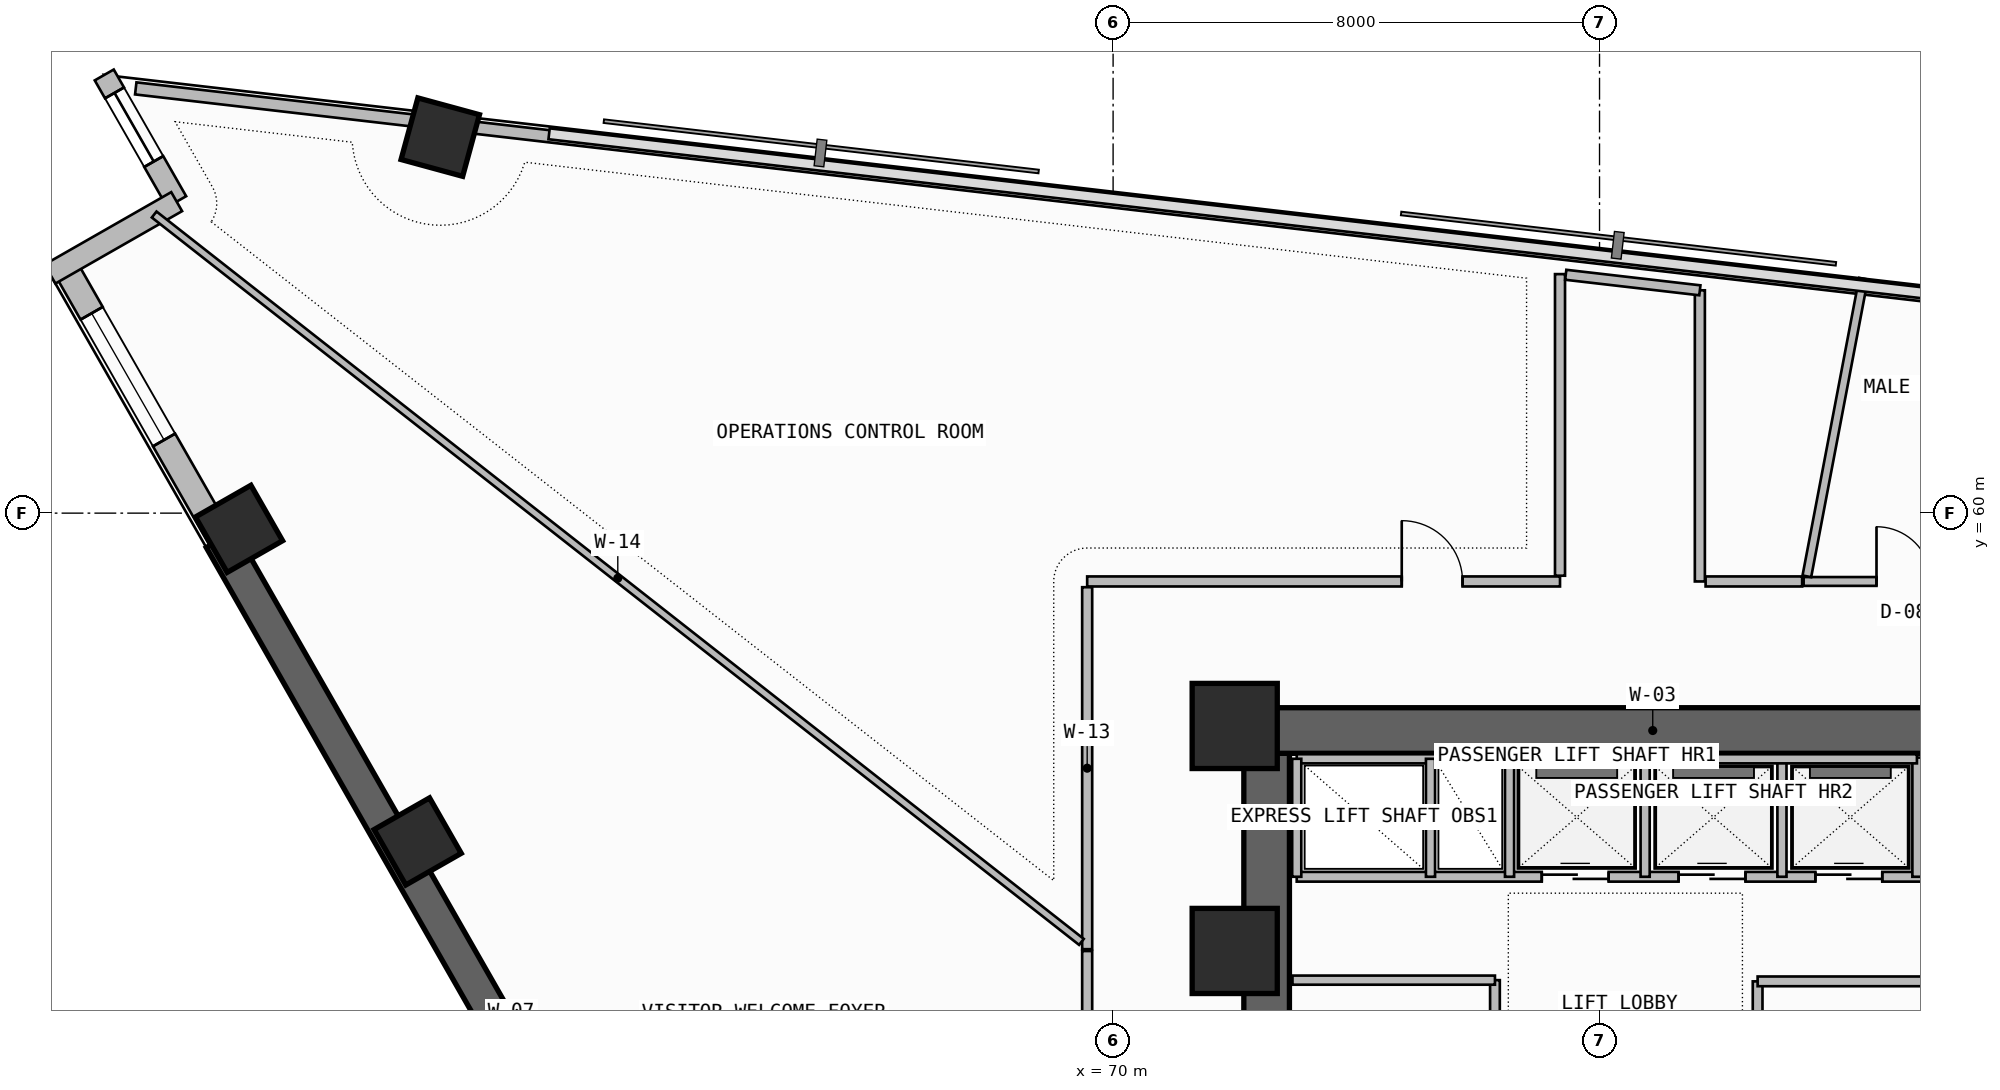
"""IFC4 building model, lengths in metres.
Left out: names, types, materials, properties, quantities, classifications, styles, units other than length and angle.
Written with IfcOpenShell. Run it as: python <this file> out.ifc"""

import sys

from ifc_helpers import new_model, si_unit, direction, frame, frame_2d, origin, origin_2d, place, context, subcontext, project, spatial, rectangle, extrude, element, fill, save


model = new_model("IFC4")
c1 = context("Model", 3, precision=1e-05, world=origin(), true_north=direction((0.0, 1.0)))
c2 = subcontext(c1, "Body", "Model", "MODEL_VIEW")
j1 = project(units=[si_unit("LENGTHUNIT", "METRE"), si_unit("PLANEANGLEUNIT", "RADIAN")], contexts=[c1])
p1 = place(None, origin())
s1 = spatial("IfcSite", under=j1, at=p1, CompositionType="ELEMENT")
p2 = place(p1, origin())
s2 = spatial("IfcBuilding", under=s1, at=p2, CompositionType="ELEMENT")
p3 = place(p2, frame((0.0, 0.0, 229.06)))
s3 = spatial("IfcBuildingStorey", under=s2, at=p3, CompositionType="ELEMENT", Elevation=229.06)
p4 = place(p3, frame((72.525, 43.35, -0.26), z_axis=(0.0, 0.0, 1.0), x_axis=(0.0, 1.0, 0.0)))
e1 = element("IfcWall", 1, at=p4, inside=s3, PredefinedType="SHEAR", context=c2, shape_type="SweptSolid", body=[
    extrude(rectangle(XDim=12.7, YDim=0.75, at=frame_2d((6.35, 0.0))), origin(), (0.0, 0.0, 1.0), 3.52),
])
p5 = place(p4, frame((1.35, 0.0, 0.26)))
e2 = element("IfcOpeningElement", 2, at=p5, cuts=e1, PredefinedType="OPENING", context=c2, shape_type="SweptSolid", body=[
    extrude(rectangle(XDim=1.2, YDim=2.2, at=frame_2d((0.6, 1.1))), frame((0.0, 0.385, 0.0), z_axis=(0.0, -1.0, 0.0), x_axis=(1.0, 0.0, 0.0)), (0.0, 0.0, 1.0), 0.77),
])
p6 = place(p3, frame((72.0, 56.425, -0.26), z_axis=(0.0, 0.0, 1.0), x_axis=(1.0, 0.0, 0.0)))
e3 = element("IfcWall", 3, at=p6, inside=s3, PredefinedType="SHEAR", context=c2, shape_type="SweptSolid", body=[
    extrude(rectangle(XDim=13.75, YDim=0.75, at=frame_2d((6.875, 0.0))), origin(), (0.0, 0.0, 1.0), 3.52),
])
for number, where, z_axis, x_axis in (
    (4, (72.0, 52.8, 0.0), (0.0, 0.0, 1.0), (1.0, 0.0, 0.0)),
    (5, (72.0, 56.5, 0.0), (0.0, 0.0, 1.0), (1.0, 0.0, 0.0)),
):
    element("IfcColumn", number, at=place(p3, frame(where, z_axis=z_axis, x_axis=x_axis)), inside=s3, PredefinedType="COLUMN", context=c2, shape_type="SweptSolid", body=[
        extrude(rectangle(XDim=1.4, YDim=1.4, at=origin_2d()), origin(), (0.0, 0.0, 1.0), 3.52),
    ])
for number, where, z_axis, x_axis in (
    (6, (58.934, 66.184, 0.0), (0.0, 0.0, 1.0), (0.263, 0.965, 0.0)),
    (7, (55.625, 59.742, 0.0), (0.0, 0.0, 1.0), (-0.496, 0.868, 0.0)),
    (8, (58.563, 54.601, 0.0), (0.0, 0.0, 1.0), (-0.496, 0.868, 0.0)),
):
    element("IfcColumn", number, at=place(p3, frame(where, z_axis=z_axis, x_axis=x_axis)), inside=s3, PredefinedType="COLUMN", context=c2, shape_type="SweptSolid", body=[
        extrude(rectangle(XDim=1.05, YDim=1.05, at=origin_2d()), origin(), (0.0, 0.0, 1.0), 3.52),
    ])
p7 = place(p3, frame((52.754, 64.068, 0.0), z_axis=(0.0, 0.0, 1.0), x_axis=(0.496209984367, -0.868202540548, 0.0)))
e9 = element("IfcWall", 9, at=p7, inside=s3, PredefinedType="SOLIDWALL", context=c2, shape_type="SweptSolid", body=[
    extrude(rectangle(XDim=5.181, YDim=0.42, at=frame_2d((2.59, 0.0))), origin(), (0.0, 0.0, 1.0), 2.237),
])
p8 = place(p7, frame((0.9, 0.0, 0.957)))
e10 = element("IfcOpeningElement", 10, at=p8, cuts=e9, PredefinedType="OPENING", context=c2, shape_type="SweptSolid", body=[
    extrude(rectangle(XDim=2.4, YDim=1.2, at=frame_2d((1.2, 0.6))), frame((0.0, 0.22, 0.0), z_axis=(0.0, -1.0, 0.0), x_axis=(1.0, 0.0, 0.0)), (0.0, 0.0, 1.0), 0.44),
])
p9 = place(p3, frame((55.325, 59.57, -0.26), z_axis=(0.0, 0.0, 1.0), x_axis=(0.496211351597, -0.868201759124, 0.0)))
e11 = element("IfcWall", 11, at=p9, inside=s3, PredefinedType="SHEAR", context=c2, shape_type="SweptSolid", body=[
    extrude(rectangle(XDim=19.243, YDim=0.55, at=frame_2d((9.622, 0.0))), origin(), (0.0, 0.0, 1.0), 3.52),
])
p10 = place(p3, frame((53.408, 67.206, 0.0), z_axis=(0.0, 0.0, 1.0), x_axis=(0.496292324652, -0.868155474838, 0.0)))
e12 = element("IfcWall", 12, at=p10, inside=s3, PredefinedType="SOLIDWALL", context=c2, shape_type="SweptSolid", body=[
    extrude(rectangle(XDim=2.4, YDim=0.36, at=frame_2d((1.2, 0.0))), origin(), (0.0, 0.0, 1.0), 3.26),
])
p11 = place(p10, frame((0.34, 0.0, 0.45)))
e13 = element("IfcOpeningElement", 13, at=p11, cuts=e12, PredefinedType="OPENING", context=c2, shape_type="SweptSolid", body=[
    extrude(rectangle(XDim=1.3, YDim=2.4, at=frame_2d((0.65, 1.2))), frame((0.0, 0.19, 0.0), z_axis=(0.0, -1.0, 0.0), x_axis=(1.0, 0.0, 0.0)), (0.0, 0.0, 1.0), 0.38),
])
p12 = place(p3, frame((54.599, 65.123, 0.0), z_axis=(0.0, 0.0, 1.0), x_axis=(-0.86818053093, -0.4962484919, 0.0)))
e14 = element("IfcWall", 14, at=p12, inside=s3, PredefinedType="SOLIDWALL", context=c2, shape_type="SweptSolid", body=[
    extrude(rectangle(XDim=2.4, YDim=0.36, at=frame_2d((1.2, 0.0))), origin(), (0.0, 0.0, 1.0), 3.26),
])
p13 = place(p3, frame((85.424, 63.338, 0.0), z_axis=(0.0, 0.0, 1.0), x_axis=(-0.993364714048, 0.115006716693, 0.0)))
e15 = element("IfcWall", 15, at=p13, inside=s3, PredefinedType="PARAPET", context=c2, shape_type="SweptSolid", body=[
    extrude(rectangle(XDim=26.302, YDim=0.2, at=frame_2d((13.151, 0.0))), origin(), (0.0, 0.0, 1.0), 1.15),
])
p14 = place(p3, frame((58.622, 66.441, 0.0), z_axis=(0.0, 0.0, 1.0), x_axis=(-0.993362937665, 0.115022059074, 0.0)))
e16 = element("IfcWall", 16, at=p14, inside=s3, PredefinedType="PARAPET", context=c2, shape_type="SweptSolid", body=[
    extrude(rectangle(XDim=4.727, YDim=0.2, at=frame_2d((2.364, 0.0))), origin(), (0.0, 0.0, 1.0), 1.15),
])
p15 = place(p3, frame((76.28, 47.18, 0.0), z_axis=(0.0, 0.0, 1.0), x_axis=(0.0, 1.0, 0.0)))
e17 = element("IfcWall", 17, at=p15, inside=s3, PredefinedType="SOLIDWALL", context=c2, shape_type="SweptSolid", body=[
    extrude(rectangle(XDim=5.14, YDim=0.16, at=frame_2d((2.57, 0.0))), origin(), (0.0, 0.0, 1.0), 3.26),
])
p16 = place(p15, frame((1.8, 0.0, 0.0)))
e18 = element("IfcOpeningElement", 18, at=p16, cuts=e17, PredefinedType="OPENING", context=c2, shape_type="SweptSolid", body=[
    extrude(rectangle(XDim=1.5, YDim=2.25, at=frame_2d((0.75, 1.125))), frame((0.0, 0.09, 0.0), z_axis=(0.0, -1.0, 0.0), x_axis=(1.0, 0.0, 0.0)), (0.0, 0.0, 1.0), 0.18),
])
p17 = place(p3, frame((72.95, 52.32, 0.0), z_axis=(0.0, 0.0, 1.0), x_axis=(1.0, 0.0, 0.0)))
e19 = element("IfcWall", 19, at=p17, inside=s3, PredefinedType="SOLIDWALL", context=c2, shape_type="SweptSolid", body=[
    extrude(rectangle(XDim=3.33, YDim=0.15, at=frame_2d((1.665, 0.0))), origin(), (0.0, 0.0, 1.0), 3.26),
])
p18 = place(p3, frame((80.6, 47.7, 0.0), z_axis=(0.0, 0.0, 1.0), x_axis=(0.0, 1.0, 0.0)))
e20 = element("IfcWall", 20, at=p18, inside=s3, PredefinedType="SOLIDWALL", context=c2, shape_type="SweptSolid", body=[
    extrude(rectangle(XDim=4.6, YDim=0.16, at=frame_2d((2.3, 0.0))), origin(), (0.0, 0.0, 1.0), 3.26),
])
p19 = place(p18, frame((1.8, 0.0, 0.0)))
e21 = element("IfcOpeningElement", 21, at=p19, cuts=e20, PredefinedType="OPENING", context=c2, shape_type="SweptSolid", body=[
    extrude(rectangle(XDim=1.0, YDim=2.2, at=frame_2d((0.5, 1.1))), frame((0.0, 0.09, 0.0), z_axis=(0.0, -1.0, 0.0), x_axis=(1.0, 0.0, 0.0)), (0.0, 0.0, 1.0), 0.18),
])
p20 = place(p3, frame((80.6, 52.3, 0.0), z_axis=(0.0, 0.0, 1.0), x_axis=(1.0, 0.0, 0.0)))
e22 = element("IfcWall", 22, at=p20, inside=s3, PredefinedType="SOLIDWALL", context=c2, shape_type="SweptSolid", body=[
    extrude(rectangle(XDim=4.22, YDim=0.16, at=frame_2d((2.11, 0.0))), origin(), (0.0, 0.0, 1.0), 3.26),
])
p21 = place(p3, frame((73.02, 54.02, 0.0), z_axis=(0.0, 0.0, 1.0), x_axis=(1.0, 0.0, 0.0)))
e23 = element("IfcWall", 23, at=p21, inside=s3, PredefinedType="SOLIDWALL", context=c2, shape_type="SweptSolid", body=[
    extrude(rectangle(XDim=12.08, YDim=0.16, at=frame_2d((6.04, 0.0))), origin(), (0.0, 0.0, 1.0), 3.26),
])
p22 = place(p21, frame((4.03, 0.0, 0.0)))
e24 = element("IfcOpeningElement", 24, at=p22, cuts=e23, PredefinedType="OPENING", context=c2, shape_type="SweptSolid", body=[
    extrude(rectangle(XDim=1.1, YDim=2.25, at=frame_2d((0.55, 1.125))), frame((0.0, 0.09, 0.0), z_axis=(0.0, -1.0, 0.0), x_axis=(1.0, 0.0, 0.0)), (0.0, 0.0, 1.0), 0.18),
])
p23 = place(p21, frame((6.28, 0.0, 0.0)))
e25 = element("IfcOpeningElement", 25, at=p23, cuts=e23, PredefinedType="OPENING", context=c2, shape_type="SweptSolid", body=[
    extrude(rectangle(XDim=1.1, YDim=2.25, at=frame_2d((0.55, 1.125))), frame((0.0, 0.09, 0.0), z_axis=(0.0, -1.0, 0.0), x_axis=(1.0, 0.0, 0.0)), (0.0, 0.0, 1.0), 0.18),
])
p24 = place(p21, frame((8.53, 0.0, 0.0)))
e26 = element("IfcOpeningElement", 26, at=p24, cuts=e23, PredefinedType="OPENING", context=c2, shape_type="SweptSolid", body=[
    extrude(rectangle(XDim=1.1, YDim=2.25, at=frame_2d((0.55, 1.125))), frame((0.0, 0.09, 0.0), z_axis=(0.0, -1.0, 0.0), x_axis=(1.0, 0.0, 0.0)), (0.0, 0.0, 1.0), 0.18),
])
p25 = place(p3, frame((73.02, 55.96, 0.0), z_axis=(0.0, 0.0, 1.0), x_axis=(1.0, 0.0, 0.0)))
e27 = element("IfcWall", 27, at=p25, inside=s3, PredefinedType="SOLIDWALL", context=c2, shape_type="SweptSolid", body=[
    extrude(rectangle(XDim=3.5, YDim=0.15, at=frame_2d((1.75, 0.0))), origin(), (0.0, 0.0, 1.0), 3.26),
])
p26 = place(p3, frame((73.02, 54.02, 0.0), z_axis=(0.0, 0.0, 1.0), x_axis=(0.0, 1.0, 0.0)))
e28 = element("IfcWall", 28, at=p26, inside=s3, PredefinedType="PLUMBINGWALL", context=c2, shape_type="SweptSolid", body=[
    extrude(rectangle(XDim=1.94, YDim=0.15, at=frame_2d((0.97, 0.0))), origin(), (0.0, 0.0, 1.0), 3.26),
])
p27 = place(p3, frame((76.52, 54.02, 0.0), z_axis=(0.0, 0.0, 1.0), x_axis=(0.0, 1.0, 0.0)))
e29 = element("IfcWall", 29, at=p27, inside=s3, PredefinedType="SOLIDWALL", context=c2, shape_type="SweptSolid", body=[
    extrude(rectangle(XDim=1.94, YDim=0.15, at=frame_2d((0.97, 0.0))), origin(), (0.0, 0.0, 1.0), 3.26),
])
p28 = place(p3, frame((75.22, 54.02, 0.0), z_axis=(0.0, 0.0, 1.0), x_axis=(0.0, 1.0, 0.0)))
e30 = element("IfcWall", 30, at=p28, inside=s3, PredefinedType="PLUMBINGWALL", context=c2, shape_type="SweptSolid", body=[
    extrude(rectangle(XDim=1.94, YDim=0.15, at=frame_2d((0.97, 0.0))), origin(), (0.0, 0.0, 1.0), 3.26),
])
for number, where, z_axis, x_axis in (
    (31, (78.75, 54.02, 0.0), (0.0, 0.0, 1.0), (0.0, 1.0, 0.0)),
    (32, (81.0, 54.02, 0.0), (0.0, 0.0, 1.0), (0.0, 1.0, 0.0)),
):
    element("IfcWall", number, at=place(p3, frame(where, z_axis=z_axis, x_axis=x_axis)), inside=s3, PredefinedType="PLUMBINGWALL", context=c2, shape_type="SweptSolid", body=[
        extrude(rectangle(XDim=1.96, YDim=0.15, at=frame_2d((0.98, 0.0))), origin(), (0.0, 0.0, 1.0), 3.26),
    ])
p29 = place(p3, frame((83.22, 54.02, 0.0), z_axis=(0.0, 0.0, 1.0), x_axis=(0.0, 1.0, 0.0)))
e33 = element("IfcWall", 33, at=p29, inside=s3, PredefinedType="SOLIDWALL", context=c2, shape_type="SweptSolid", body=[
    extrude(rectangle(XDim=1.96, YDim=0.15, at=frame_2d((0.98, 0.0))), origin(), (0.0, 0.0, 1.0), 3.26),
])
p30 = place(p3, frame((76.52, 55.96, 0.0), z_axis=(0.0, 0.0, 1.0), x_axis=(1.0, 0.0, 0.0)))
e34 = element("IfcWall", 34, at=p30, inside=s3, PredefinedType="SOLIDWALL", context=c2, shape_type="SweptSolid", body=[
    extrude(rectangle(XDim=6.7, YDim=0.15, at=frame_2d((3.35, 0.0))), origin(), (0.0, 0.0, 1.0), 3.26),
])
p31 = place(p3, frame((84.654, 58.876, 0.0), z_axis=(0.0, 0.0, 1.0), x_axis=(-1.0, 0.0, 0.0)))
e35 = element("IfcWall", 35, at=p31, inside=s3, PredefinedType="PARTITIONING", context=c2, shape_type="SweptSolid", body=[
    extrude(rectangle(XDim=3.297, YDim=0.145, at=frame_2d((1.648, 0.0))), origin(), (0.0, 0.0, 1.0), 3.26),
])
p32 = place(p31, frame((1.198, 0.0, 0.0)))
e36 = element("IfcOpeningElement", 36, at=p32, cuts=e35, PredefinedType="OPENING", context=c2, shape_type="SweptSolid", body=[
    extrude(rectangle(XDim=0.9, YDim=2.1, at=frame_2d((0.45, 1.05))), frame((0.0, 0.083, 0.0), z_axis=(0.0, -1.0, 0.0), x_axis=(1.0, 0.0, 0.0)), (0.0, 0.0, 1.0), 0.165),
])
p33 = place(p3, frame((81.41, 58.961, 0.0), z_axis=(0.0, 0.0, 1.0), x_axis=(0.187053573784, 0.982349713969, 0.0)))
e37 = element("IfcWall", 37, at=p33, inside=s3, PredefinedType="PARTITIONING", context=c2, shape_type="SweptSolid", body=[
    extrude(rectangle(XDim=4.983, YDim=0.145, at=frame_2d((2.492, 0.0))), origin(), (0.0, 0.0, 1.0), 3.26),
])
p34 = place(p3, frame((77.35, 58.876, 0.0), z_axis=(0.0, 0.0, 1.0), x_axis=(-1.0, 0.0, 0.0)))
e38 = element("IfcWall", 38, at=p34, inside=s3, PredefinedType="PARTITIONING", context=c2, shape_type="SweptSolid", body=[
    extrude(rectangle(XDim=7.777, YDim=0.165, at=frame_2d((3.888, 0.0))), origin(), (0.0, 0.0, 1.0), 3.26),
])
p35 = place(p34, frame((1.603, 0.0, 0.0)))
e39 = element("IfcOpeningElement", 39, at=p35, cuts=e38, PredefinedType="OPENING", context=c2, shape_type="SweptSolid", body=[
    extrude(rectangle(XDim=1.0, YDim=2.2, at=frame_2d((0.5, 1.1))), frame((0.0, 0.093, 0.0), z_axis=(0.0, -1.0, 0.0), x_axis=(1.0, 0.0, 0.0)), (0.0, 0.0, 1.0), 0.185),
])
p36 = place(p3, frame((69.573, 58.782, 0.0), z_axis=(0.0, 0.0, 1.0), x_axis=(0.0, -1.0, 0.0)))
e40 = element("IfcWall", 40, at=p36, inside=s3, PredefinedType="PARTITIONING", context=c2, shape_type="SweptSolid", body=[
    extrude(rectangle(XDim=5.953, YDim=0.165, at=frame_2d((2.977, 0.0))), origin(), (0.0, 0.0, 1.0), 2.237),
])
p37 = place(p3, frame((77.35, 63.931, 0.0), z_axis=(0.0, 0.0, 1.0), x_axis=(0.0, -1.0, 0.0)))
e41 = element("IfcWall", 41, at=p37, inside=s3, PredefinedType="PARTITIONING", context=c2, shape_type="SweptSolid", body=[
    extrude(rectangle(XDim=4.96, YDim=0.165, at=frame_2d((2.48, 0.0))), origin(), (0.0, 0.0, 1.0), 3.26),
])
p38 = place(p3, frame((79.65, 58.876, 0.0), z_axis=(0.0, 0.0, 1.0), x_axis=(0.0, 1.0, 0.0)))
e42 = element("IfcWall", 42, at=p38, inside=s3, PredefinedType="PARTITIONING", context=c2, shape_type="SweptSolid", body=[
    extrude(rectangle(XDim=4.788, YDim=0.165, at=frame_2d((2.394, 0.0))), origin(), (0.0, 0.0, 1.0), 3.26),
])
p39 = place(p3, frame((79.65, 63.665, 0.0), z_axis=(0.0, 0.0, 1.0), x_axis=(-0.993362136032, 0.115028981987, 0.0)))
e43 = element("IfcWall", 43, at=p39, inside=s3, PredefinedType="PARTITIONING", context=c2, shape_type="SweptSolid", body=[
    extrude(rectangle(XDim=2.22, YDim=0.165, at=frame_2d((1.11, 0.0))), origin(), (0.0, 0.0, 1.0), 3.26),
])
p40 = place(p3, frame((81.333, 58.876, 0.0), z_axis=(0.0, 0.0, 1.0), x_axis=(-1.0, 0.0, 0.0)))
e44 = element("IfcWall", 44, at=p40, inside=s3, PredefinedType="PARTITIONING", context=c2, shape_type="SweptSolid", body=[
    extrude(rectangle(XDim=1.588, YDim=0.165, at=frame_2d((0.794, 0.0))), origin(), (0.0, 0.0, 1.0), 3.26),
])
p41 = place(p3, frame((69.479, 52.949, 0.0), z_axis=(0.0, 0.0, 1.0), x_axis=(-0.786818994279, 0.617183822084, 0.0)))
e45 = element("IfcWall", 45, at=p41, inside=s3, PredefinedType="PARTITIONING", context=c2, shape_type="SweptSolid", body=[
    extrude(rectangle(XDim=19.382, YDim=0.125, at=frame_2d((9.691, 0.0))), origin(), (0.0, 0.0, 1.0), 2.237),
])
p42 = place(p3, frame((69.573, 52.799, 0.0), z_axis=(0.0, 0.0, 1.0), x_axis=(0.0, -1.0, 0.0)))
e46 = element("IfcWall", 46, at=p42, inside=s3, PredefinedType="PARTITIONING", context=c2, shape_type="SweptSolid", body=[
    extrude(rectangle(XDim=8.125, YDim=0.165, at=frame_2d((4.062, 0.0))), origin(), (0.0, 0.0, 1.0), 2.237),
])
p43 = place(p42, frame((3.562, 0.0, 0.0)))
e47 = element("IfcOpeningElement", 47, at=p43, cuts=e46, PredefinedType="OPENING", context=c2, shape_type="SweptSolid", body=[
    extrude(rectangle(XDim=1.0, YDim=2.2, at=frame_2d((0.5, 1.1))), frame((0.0, 0.093, 0.0), z_axis=(0.0, -1.0, 0.0), x_axis=(1.0, 0.0, 0.0)), (0.0, 0.0, 1.0), 0.185),
])
p44 = place(p8, origin())
e48 = element("IfcWindow", 48, at=p44, inside=s3, PartitioningType="SINGLE_PANEL", PredefinedType="WINDOW", context=c2, shape_type="SweptSolid", body=[
    extrude(rectangle(XDim=2.4, YDim=1.2, at=frame_2d((1.2, 0.6))), frame((0.0, 0.03, 0.0), z_axis=(0.0, -1.0, 0.0), x_axis=(1.0, 0.0, 0.0)), (0.0, 0.0, 1.0), 0.06),
])
fill(e10, e48)
p45 = place(p11, origin())
e49 = element("IfcWindow", 49, at=p45, inside=s3, PartitioningType="SINGLE_PANEL", PredefinedType="WINDOW", context=c2, shape_type="SweptSolid", body=[
    extrude(rectangle(XDim=1.3, YDim=2.4, at=frame_2d((0.65, 1.2))), frame((0.0, 0.03, 0.0), z_axis=(0.0, -1.0, 0.0), x_axis=(1.0, 0.0, 0.0)), (0.0, 0.0, 1.0), 0.06),
])
fill(e13, e49)
p46 = place(p22, origin())
e50 = element("IfcDoor", 50, at=p46, inside=s3, OperationType="DOUBLE_DOOR_SLIDING", PredefinedType="DOOR", context=c2, shape_type="SweptSolid", body=[
    extrude(rectangle(XDim=1.1, YDim=2.25, at=frame_2d((0.55, 1.125))), frame((0.0, 0.025, 0.0), z_axis=(0.0, -1.0, 0.0), x_axis=(1.0, 0.0, 0.0)), (0.0, 0.0, 1.0), 0.05),
])
fill(e24, e50)
p47 = place(p23, origin())
e51 = element("IfcDoor", 51, at=p47, inside=s3, OperationType="DOUBLE_DOOR_SLIDING", PredefinedType="DOOR", context=c2, shape_type="SweptSolid", body=[
    extrude(rectangle(XDim=1.1, YDim=2.25, at=frame_2d((0.55, 1.125))), frame((0.0, 0.025, 0.0), z_axis=(0.0, -1.0, 0.0), x_axis=(1.0, 0.0, 0.0)), (0.0, 0.0, 1.0), 0.05),
])
fill(e25, e51)
p48 = place(p24, origin())
e52 = element("IfcDoor", 52, at=p48, inside=s3, OperationType="DOUBLE_DOOR_SLIDING", PredefinedType="DOOR", context=c2, shape_type="SweptSolid", body=[
    extrude(rectangle(XDim=1.1, YDim=2.25, at=frame_2d((0.55, 1.125))), frame((0.0, 0.025, 0.0), z_axis=(0.0, -1.0, 0.0), x_axis=(1.0, 0.0, 0.0)), (0.0, 0.0, 1.0), 0.05),
])
fill(e26, e52)
p49 = place(p32, frame((0.9, 0.0, 0.0), z_axis=(0.0, 0.0, 1.0), x_axis=(-1.0, 0.0, 0.0)))
e53 = element("IfcDoor", 53, at=p49, inside=s3, OperationType="SINGLE_SWING_LEFT", PredefinedType="DOOR", context=c2, shape_type="SweptSolid", body=[
    extrude(rectangle(XDim=0.9, YDim=2.1, at=frame_2d((0.45, 1.05))), frame((0.0, 0.025, 0.0), z_axis=(0.0, -1.0, 0.0), x_axis=(1.0, 0.0, 0.0)), (0.0, 0.0, 1.0), 0.05),
])
fill(e36, e53)
p50 = place(p35, frame((1.0, 0.0, 0.0), z_axis=(0.0, 0.0, 1.0), x_axis=(-1.0, 0.0, 0.0)))
e54 = element("IfcDoor", 54, at=p50, inside=s3, OperationType="SINGLE_SWING_LEFT", PredefinedType="DOOR", context=c2, shape_type="SweptSolid", body=[
    extrude(rectangle(XDim=1.0, YDim=2.2, at=frame_2d((0.5, 1.1))), frame((0.0, 0.025, 0.0), z_axis=(0.0, -1.0, 0.0), x_axis=(1.0, 0.0, 0.0)), (0.0, 0.0, 1.0), 0.05),
])
fill(e39, e54)
save(model, sys.argv[1])
